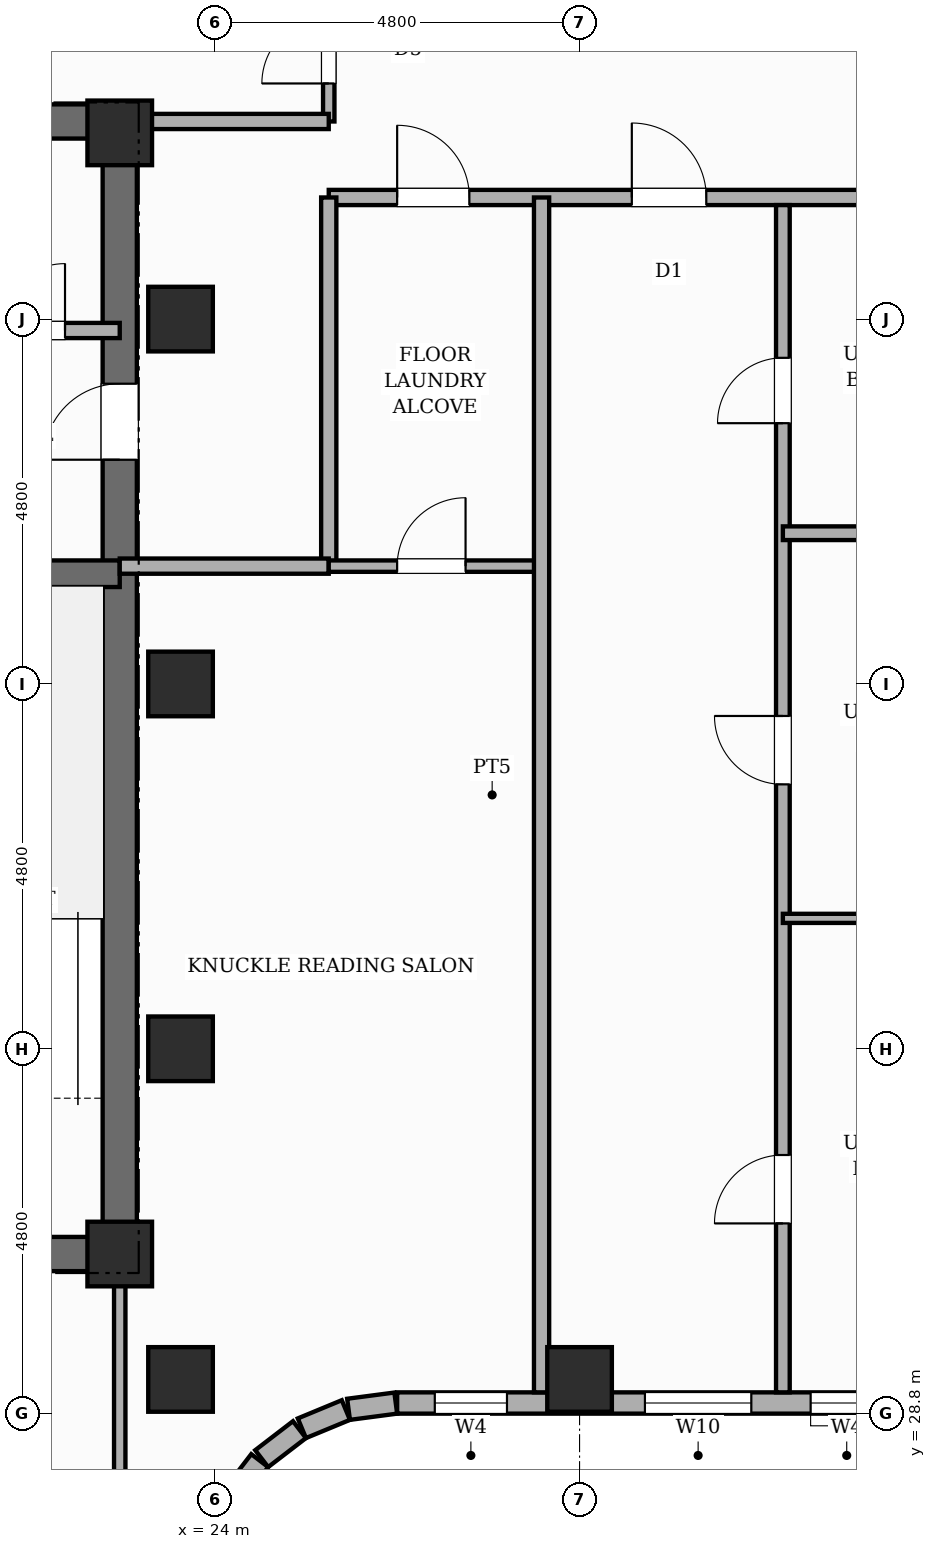
"""IFC4 building model, lengths in metres.
Left out: names, types, materials, properties, quantities, classifications, styles, units other than length and angle.
Written with IfcOpenShell. Run it as: python <this file> out.ifc"""

import sys

from ifc_helpers import new_model, si_unit, direction, frame, frame_2d, origin, origin_2d, place, context, subcontext, project, spatial, rectangle, extrude, element, fill, save


model = new_model("IFC4")
c1 = context("Model", 3, precision=1e-05, world=origin(), true_north=direction((0.0, 1.0)))
c2 = subcontext(c1, "Body", "Model", "MODEL_VIEW")
j1 = project(units=[si_unit("LENGTHUNIT", "METRE"), si_unit("PLANEANGLEUNIT", "RADIAN")], contexts=[c1])
p1 = place(None, origin())
s1 = spatial("IfcSite", under=j1, at=p1, CompositionType="ELEMENT")
p2 = place(p1, origin())
s2 = spatial("IfcBuilding", under=s1, at=p2, CompositionType="ELEMENT")
p3 = place(p2, frame((0.0, 0.0, 207.4)))
s3 = spatial("IfcBuildingStorey", under=s2, at=p3, CompositionType="ELEMENT", Elevation=207.4)
p4 = place(p3, frame((22.75, 30.675, 0.0), z_axis=(0.0, 0.0, 1.0), x_axis=(0.0, 1.0, 0.0)))
e1 = element("IfcWall", 1, at=p4, inside=s3, PredefinedType="SHEAR", context=c2, shape_type="SweptSolid", body=[
    extrude(rectangle(XDim=15.35, YDim=0.45, at=frame_2d((7.675, 0.0))), origin(), (0.0, 0.0, 1.0), 3.6),
])
p5 = place(p4, frame((10.675, 0.0, 0.0)))
e2 = element("IfcOpeningElement", 2, at=p5, cuts=e1, PredefinedType="OPENING", context=c2, shape_type="SweptSolid", body=[
    extrude(rectangle(XDim=1.0, YDim=2.15, at=frame_2d((0.5, 1.075))), frame((0.0, 0.235, 0.0), z_axis=(0.0, -1.0, 0.0), x_axis=(1.0, 0.0, 0.0)), (0.0, 0.0, 1.0), 0.47),
])
p6 = place(p3, frame((6.05, 45.8, 0.0), z_axis=(0.0, 0.0, 1.0), x_axis=(1.0, 0.0, 0.0)))
e3 = element("IfcWall", 3, at=p6, inside=s3, PredefinedType="SHEAR", context=c2, shape_type="SweptSolid", body=[
    extrude(rectangle(XDim=16.7, YDim=0.45, at=frame_2d((8.35, 0.0))), origin(), (0.0, 0.0, 1.0), 3.6),
])
p7 = place(p3, frame((18.84, 30.9, 0.0), z_axis=(0.0, 0.0, 1.0), x_axis=(1.0, 0.0, 0.0)))
e4 = element("IfcWall", 4, at=p7, inside=s3, PredefinedType="SHEAR", context=c2, shape_type="SweptSolid", body=[
    extrude(rectangle(XDim=3.91, YDim=0.45, at=frame_2d((1.955, 0.0))), origin(), (0.0, 0.0, 1.0), 3.6),
])
p8 = place(p3, frame((18.84, 39.85, 0.0), z_axis=(0.0, 0.0, 1.0), x_axis=(1.0, 0.0, 0.0)))
e5 = element("IfcWall", 5, at=p8, inside=s3, PredefinedType="SHEAR", context=c2, shape_type="SweptSolid", body=[
    extrude(rectangle(XDim=3.91, YDim=0.35, at=frame_2d((1.955, 0.0))), origin(), (0.0, 0.0, 1.0), 3.6),
])
for number, where, z_axis, x_axis in (
    (6, (22.75, 30.9, 0.0), (0.0, 0.0, 1.0), (1.0, 0.0, 0.0)),
    (7, (22.75, 45.65, 0.0), (0.0, 0.0, 1.0), (1.0, 0.0, 0.0)),
    (8, (23.55, 29.25, 0.0), (0.0, 0.0, 1.0), (1.0, 0.0, 0.0)),
    (9, (23.55, 33.6, 0.0), (0.0, 0.0, 1.0), (1.0, 0.0, 0.0)),
    (10, (23.55, 38.4, 0.0), (0.0, 0.0, 1.0), (1.0, 0.0, 0.0)),
    (11, (23.55, 43.2, 0.0), (0.0, 0.0, 1.0), (1.0, 0.0, 0.0)),
    (12, (28.8, 29.25, 0.0), (0.0, 0.0, 1.0), (1.0, 0.0, 0.0)),
):
    element("IfcColumn", number, at=place(p3, frame(where, z_axis=z_axis, x_axis=x_axis)), inside=s3, PredefinedType="COLUMN", context=c2, shape_type="SweptSolid", body=[
        extrude(rectangle(XDim=0.85, YDim=0.85, at=origin_2d()), origin(), (0.0, 0.0, 1.0), 3.6),
    ])
p9 = place(p3, frame((50.4, 28.94, 0.0), z_axis=(0.0, 0.0, 1.0), x_axis=(-1.0, 0.0, 0.0)))
e13 = element("IfcWall", 13, at=p9, inside=s3, PredefinedType="STANDARD", context=c2, shape_type="SweptSolid", body=[
    extrude(rectangle(XDim=24.0, YDim=0.28, at=frame_2d((12.0, 0.0))), origin(), (0.0, 0.0, 1.0), 2.66),
])
p10 = place(p9, frame((17.61, 0.0, 0.45)))
e14 = element("IfcOpeningElement", 14, at=p10, cuts=e13, PredefinedType="OPENING", context=c2, shape_type="SweptSolid", body=[
    extrude(rectangle(XDim=0.95, YDim=1.8, at=frame_2d((0.475, 0.9))), frame((0.0, 0.15, 0.0), z_axis=(0.0, -1.0, 0.0), x_axis=(1.0, 0.0, 0.0)), (0.0, 0.0, 1.0), 0.3),
])
p11 = place(p9, frame((9.438, 0.0, 0.65)))
e15 = element("IfcOpeningElement", 15, at=p11, cuts=e13, PredefinedType="OPENING", context=c2, shape_type="SweptSolid", body=[
    extrude(rectangle(XDim=1.4, YDim=1.1, at=frame_2d((0.7, 0.55))), frame((0.0, 0.15, 0.0), z_axis=(0.0, -1.0, 0.0), x_axis=(1.0, 0.0, 0.0)), (0.0, 0.0, 1.0), 0.3),
])
p12 = place(p9, frame((22.555, 0.0, 0.45)))
e16 = element("IfcOpeningElement", 16, at=p12, cuts=e13, PredefinedType="OPENING", context=c2, shape_type="SweptSolid", body=[
    extrude(rectangle(XDim=0.95, YDim=1.8, at=frame_2d((0.475, 0.9))), frame((0.0, 0.15, 0.0), z_axis=(0.0, -1.0, 0.0), x_axis=(1.0, 0.0, 0.0)), (0.0, 0.0, 1.0), 0.3),
])
p13 = place(p9, frame((4.1, 0.0, 0.65)))
e17 = element("IfcOpeningElement", 17, at=p13, cuts=e13, PredefinedType="OPENING", context=c2, shape_type="SweptSolid", body=[
    extrude(rectangle(XDim=1.4, YDim=1.1, at=frame_2d((0.7, 0.55))), frame((0.0, 0.15, 0.0), z_axis=(0.0, -1.0, 0.0), x_axis=(1.0, 0.0, 0.0)), (0.0, 0.0, 1.0), 0.3),
])
p14 = place(p9, frame((19.34, 0.0, 0.65)))
e18 = element("IfcOpeningElement", 18, at=p14, cuts=e13, PredefinedType="OPENING", context=c2, shape_type="SweptSolid", body=[
    extrude(rectangle(XDim=1.4, YDim=1.1, at=frame_2d((0.7, 0.55))), frame((0.0, 0.15, 0.0), z_axis=(0.0, -1.0, 0.0), x_axis=(1.0, 0.0, 0.0)), (0.0, 0.0, 1.0), 0.3),
])
p15 = place(p9, frame((13.76, 0.0, 0.65)))
e19 = element("IfcOpeningElement", 19, at=p15, cuts=e13, PredefinedType="OPENING", context=c2, shape_type="SweptSolid", body=[
    extrude(rectangle(XDim=1.4, YDim=1.1, at=frame_2d((0.7, 0.55))), frame((0.0, 0.15, 0.0), z_axis=(0.0, -1.0, 0.0), x_axis=(1.0, 0.0, 0.0)), (0.0, 0.0, 1.0), 0.3),
])
p16 = place(p9, frame((0.681, 0.0, 0.45)))
e20 = element("IfcOpeningElement", 20, at=p16, cuts=e13, PredefinedType="OPENING", context=c2, shape_type="SweptSolid", body=[
    extrude(rectangle(XDim=0.95, YDim=1.8, at=frame_2d((0.475, 0.9))), frame((0.0, 0.15, 0.0), z_axis=(0.0, -1.0, 0.0), x_axis=(1.0, 0.0, 0.0)), (0.0, 0.0, 1.0), 0.3),
])
p17 = place(p3, frame((26.382, 28.939, 0.0), z_axis=(0.0, 0.0, 1.0), x_axis=(-0.9914410257, -0.130555323746, 0.0)))
e21 = element("IfcWall", 21, at=p17, inside=s3, PredefinedType="STANDARD", context=c2, shape_type="SweptSolid", body=[
    extrude(rectangle(XDim=0.626, YDim=0.28, at=frame_2d((0.313, 0.0))), origin(), (0.0, 0.0, 1.0), 3.38),
])
p18 = place(p3, frame((25.725, 28.847, 0.0), z_axis=(0.0, 0.0, 1.0), x_axis=(-0.923974080304, -0.382455093999, 0.0)))
e22 = element("IfcWall", 22, at=p18, inside=s3, PredefinedType="STANDARD", context=c2, shape_type="SweptSolid", body=[
    extrude(rectangle(XDim=0.626, YDim=0.28, at=frame_2d((0.313, 0.0))), origin(), (0.0, 0.0, 1.0), 3.38),
])
for number, where, z_axis, x_axis in (
    (23, (25.115, 28.59, 0.0), (0.0, 0.0, 1.0), (-0.793, -0.609, 0.0)),
    (24, (24.592, 28.182, 0.0), (0.0, 0.0, 1.0), (-0.609, -0.793, 0.0)),
):
    element("IfcWall", number, at=place(p3, frame(where, z_axis=z_axis, x_axis=x_axis)), inside=s3, PredefinedType="STANDARD", context=c2, shape_type="SweptSolid", body=[
        extrude(rectangle(XDim=0.626, YDim=0.28, at=frame_2d((0.313, 0.0))), origin(), (0.0, 0.0, 1.0), 3.38),
    ])
p19 = place(p3, frame((20.5, 43.05, 0.0), z_axis=(0.0, 0.0, 1.0), x_axis=(1.0, 0.0, 0.0)))
e25 = element("IfcWall", 25, at=p19, inside=s3, PredefinedType="POLYGONAL", context=c2, shape_type="SweptSolid", body=[
    extrude(rectangle(XDim=2.25, YDim=0.2, at=frame_2d((1.125, 0.0))), origin(), (0.0, 0.0, 1.0), 2.66),
])
p20 = place(p19, frame((0.65, 0.0, 0.0)))
e26 = element("IfcOpeningElement", 26, at=p20, cuts=e25, PredefinedType="OPENING", context=c2, shape_type="SweptSolid", body=[
    extrude(rectangle(XDim=0.88, YDim=2.1, at=frame_2d((0.44, 1.05))), frame((0.0, 0.11, 0.0), z_axis=(0.0, -1.0, 0.0), x_axis=(1.0, 0.0, 0.0)), (0.0, 0.0, 1.0), 0.22),
])
p21 = place(p3, frame((22.75, 25.75, 0.0), z_axis=(0.0, 0.0, 1.0), x_axis=(0.0, 1.0, 0.0)))
e27 = element("IfcWall", 27, at=p21, inside=s3, PredefinedType="PARTITIONING", context=c2, shape_type="SweptSolid", body=[
    extrude(rectangle(XDim=5.15, YDim=0.15, at=frame_2d((2.575, 0.0))), origin(), (0.0, 0.0, 1.0), 3.38),
])
p22 = place(p3, frame((25.5, 45.8, 0.0), z_axis=(0.0, 0.0, 1.0), x_axis=(0.0, 1.0, 0.0)))
e28 = element("IfcWall", 28, at=p22, inside=s3, PredefinedType="PARTITIONING", context=c2, shape_type="SweptSolid", body=[
    extrude(rectangle(XDim=1.92, YDim=0.15, at=frame_2d((0.96, 0.0))), origin(), (0.0, 0.0, 1.0), 3.38),
])
p23 = place(p22, frame((0.5, 0.0, 0.0)))
e29 = element("IfcOpeningElement", 29, at=p23, cuts=e28, PredefinedType="OPENING", context=c2, shape_type="SweptSolid", body=[
    extrude(rectangle(XDim=0.88, YDim=2.1, at=frame_2d((0.44, 1.05))), frame((0.0, 0.085, 0.0), z_axis=(0.0, -1.0, 0.0), x_axis=(1.0, 0.0, 0.0)), (0.0, 0.0, 1.0), 0.17),
])
p24 = place(p3, frame((22.75, 45.8, 0.0), z_axis=(0.0, 0.0, 1.0), x_axis=(1.0, 0.0, 0.0)))
e30 = element("IfcWall", 30, at=p24, inside=s3, PredefinedType="PARTITIONING", context=c2, shape_type="SweptSolid", body=[
    extrude(rectangle(XDim=2.75, YDim=0.2, at=frame_2d((1.375, 0.0))), origin(), (0.0, 0.0, 1.0), 3.38),
])
p25 = place(p3, frame((25.5, 44.8, 0.0), z_axis=(0.0, 0.0, 1.0), x_axis=(1.0, 0.0, 0.0)))
e31 = element("IfcWall", 31, at=p25, inside=s3, PredefinedType="PARTITIONING", context=c2, shape_type="SweptSolid", body=[
    extrude(rectangle(XDim=16.28, YDim=0.2, at=frame_2d((8.14, 0.0))), origin(), (0.0, 0.0, 1.0), 3.38),
])
p26 = place(p25, frame((0.9, 0.0, 0.0)))
e32 = element("IfcOpeningElement", 32, at=p26, cuts=e31, PredefinedType="OPENING", context=c2, shape_type="SweptSolid", body=[
    extrude(rectangle(XDim=0.95, YDim=2.15, at=frame_2d((0.475, 1.075))), frame((0.0, 0.11, 0.0), z_axis=(0.0, -1.0, 0.0), x_axis=(1.0, 0.0, 0.0)), (0.0, 0.0, 1.0), 0.22),
])
p27 = place(p25, frame((3.988, 0.0, 0.0)))
e33 = element("IfcOpeningElement", 33, at=p27, cuts=e31, PredefinedType="OPENING", context=c2, shape_type="SweptSolid", body=[
    extrude(rectangle(XDim=0.98, YDim=2.18, at=frame_2d((0.49, 1.09))), frame((0.0, 0.11, 0.0), z_axis=(0.0, -1.0, 0.0), x_axis=(1.0, 0.0, 0.0)), (0.0, 0.0, 1.0), 0.22),
])
p28 = place(p25, frame((9.99, 0.0, 0.0)))
e34 = element("IfcOpeningElement", 34, at=p28, cuts=e31, PredefinedType="OPENING", context=c2, shape_type="SweptSolid", body=[
    extrude(rectangle(XDim=0.98, YDim=2.18, at=frame_2d((0.49, 1.09))), frame((0.0, 0.11, 0.0), z_axis=(0.0, -1.0, 0.0), x_axis=(1.0, 0.0, 0.0)), (0.0, 0.0, 1.0), 0.22),
])
p29 = place(p3, frame((25.5, 39.95, 0.0), z_axis=(0.0, 0.0, 1.0), x_axis=(0.0, 1.0, 0.0)))
e35 = element("IfcWall", 35, at=p29, inside=s3, PredefinedType="PARTITIONING", context=c2, shape_type="SweptSolid", body=[
    extrude(rectangle(XDim=4.85, YDim=0.2, at=frame_2d((2.425, 0.0))), origin(), (0.0, 0.0, 1.0), 3.38),
])
p30 = place(p3, frame((22.75, 39.95, 0.0), z_axis=(0.0, 0.0, 1.0), x_axis=(1.0, 0.0, 0.0)))
e36 = element("IfcWall", 36, at=p30, inside=s3, PredefinedType="PARTITIONING", context=c2, shape_type="SweptSolid", body=[
    extrude(rectangle(XDim=2.75, YDim=0.2, at=frame_2d((1.375, 0.0))), origin(), (0.0, 0.0, 1.0), 3.38),
])
p31 = place(p3, frame((25.5, 39.95, 0.0), z_axis=(0.0, 0.0, 1.0), x_axis=(1.0, 0.0, 0.0)))
e37 = element("IfcWall", 37, at=p31, inside=s3, PredefinedType="PARTITIONING", context=c2, shape_type="SweptSolid", body=[
    extrude(rectangle(XDim=2.8, YDim=0.15, at=frame_2d((1.4, 0.0))), origin(), (0.0, 0.0, 1.0), 3.38),
])
p32 = place(p31, frame((0.9, 0.0, 0.0)))
e38 = element("IfcOpeningElement", 38, at=p32, cuts=e37, PredefinedType="OPENING", context=c2, shape_type="SweptSolid", body=[
    extrude(rectangle(XDim=0.9, YDim=2.15, at=frame_2d((0.45, 1.075))), frame((0.0, 0.085, 0.0), z_axis=(0.0, -1.0, 0.0), x_axis=(1.0, 0.0, 0.0)), (0.0, 0.0, 1.0), 0.17),
])
p33 = place(p3, frame((28.3, 29.08, 0.0), z_axis=(0.0, 0.0, 1.0), x_axis=(0.0, 1.0, 0.0)))
e39 = element("IfcWall", 39, at=p33, inside=s3, PredefinedType="SOLIDWALL", context=c2, shape_type="SweptSolid", body=[
    extrude(rectangle(XDim=15.72, YDim=0.2, at=frame_2d((7.86, 0.0))), origin(), (0.0, 0.0, 1.0), 3.38),
])
p34 = place(p3, frame((31.475, 29.08, 0.0), z_axis=(0.0, 0.0, 1.0), x_axis=(0.0, 1.0, 0.0)))
e40 = element("IfcWall", 40, at=p34, inside=s3, PredefinedType="PLUMBINGWALL", context=c2, shape_type="SweptSolid", body=[
    extrude(rectangle(XDim=15.62, YDim=0.18, at=frame_2d((7.81, 0.0))), origin(), (0.0, 0.0, 1.0), 3.38),
])
p35 = place(p34, frame((2.223, 0.0, 0.0)))
e41 = element("IfcOpeningElement", 41, at=p35, cuts=e40, PredefinedType="OPENING", context=c2, shape_type="SweptSolid", body=[
    extrude(rectangle(XDim=0.9, YDim=2.15, at=frame_2d((0.45, 1.075))), frame((0.0, 0.1, 0.0), z_axis=(0.0, -1.0, 0.0), x_axis=(1.0, 0.0, 0.0)), (0.0, 0.0, 1.0), 0.2),
])
p36 = place(p34, frame((7.999, 0.0, 0.0)))
e42 = element("IfcOpeningElement", 42, at=p36, cuts=e40, PredefinedType="OPENING", context=c2, shape_type="SweptSolid", body=[
    extrude(rectangle(XDim=0.9, YDim=2.15, at=frame_2d((0.45, 1.075))), frame((0.0, 0.1, 0.0), z_axis=(0.0, -1.0, 0.0), x_axis=(1.0, 0.0, 0.0)), (0.0, 0.0, 1.0), 0.2),
])
p37 = place(p34, frame((12.75, 0.0, 0.0)))
e43 = element("IfcOpeningElement", 43, at=p37, cuts=e40, PredefinedType="OPENING", context=c2, shape_type="SweptSolid", body=[
    extrude(rectangle(XDim=0.86, YDim=2.1, at=frame_2d((0.43, 1.05))), frame((0.0, 0.1, 0.0), z_axis=(0.0, -1.0, 0.0), x_axis=(1.0, 0.0, 0.0)), (0.0, 0.0, 1.0), 0.2),
])
p38 = place(p3, frame((31.475, 35.316, 0.0), z_axis=(0.0, 0.0, 1.0), x_axis=(1.0, 0.0, 0.0)))
e44 = element("IfcWall", 44, at=p38, inside=s3, PredefinedType="PARTITIONING", context=c2, shape_type="SweptSolid", body=[
    extrude(rectangle(XDim=3.325, YDim=0.12, at=frame_2d((1.663, 0.0))), origin(), (0.0, 0.0, 1.0), 3.38),
])
p39 = place(p3, frame((31.475, 40.383, 0.0), z_axis=(0.0, 0.0, 1.0), x_axis=(1.0, 0.0, 0.0)))
e45 = element("IfcWall", 45, at=p39, inside=s3, PredefinedType="PLUMBINGWALL", context=c2, shape_type="SweptSolid", body=[
    extrude(rectangle(XDim=3.325, YDim=0.18, at=frame_2d((1.663, 0.0))), origin(), (0.0, 0.0, 1.0), 3.38),
])
p40 = place(p10, origin())
e46 = element("IfcWindow", 46, at=p40, inside=s3, PartitioningType="SINGLE_PANEL", PredefinedType="WINDOW", context=c2, shape_type="SweptSolid", body=[
    extrude(rectangle(XDim=0.95, YDim=1.8, at=frame_2d((0.475, 0.9))), frame((0.0, 0.03, 0.0), z_axis=(0.0, -1.0, 0.0), x_axis=(1.0, 0.0, 0.0)), (0.0, 0.0, 1.0), 0.06),
])
fill(e14, e46)
p41 = place(p12, origin())
e47 = element("IfcWindow", 47, at=p41, inside=s3, PartitioningType="SINGLE_PANEL", PredefinedType="WINDOW", context=c2, shape_type="SweptSolid", body=[
    extrude(rectangle(XDim=0.95, YDim=1.8, at=frame_2d((0.475, 0.9))), frame((0.0, 0.03, 0.0), z_axis=(0.0, -1.0, 0.0), x_axis=(1.0, 0.0, 0.0)), (0.0, 0.0, 1.0), 0.06),
])
fill(e16, e47)
p42 = place(p14, origin())
e48 = element("IfcWindow", 48, at=p42, inside=s3, PartitioningType="SINGLE_PANEL", PredefinedType="WINDOW", context=c2, shape_type="SweptSolid", body=[
    extrude(rectangle(XDim=1.4, YDim=1.1, at=frame_2d((0.7, 0.55))), frame((0.0, 0.03, 0.0), z_axis=(0.0, -1.0, 0.0), x_axis=(1.0, 0.0, 0.0)), (0.0, 0.0, 1.0), 0.06),
])
fill(e18, e48)
p43 = place(p5, origin())
e49 = element("IfcDoor", 49, at=p43, inside=s3, OperationType="SINGLE_SWING_LEFT", PredefinedType="DOOR", context=c2, shape_type="SweptSolid", body=[
    extrude(rectangle(XDim=1.0, YDim=2.15, at=frame_2d((0.5, 1.075))), frame((0.0, 0.025, 0.0), z_axis=(0.0, -1.0, 0.0), x_axis=(1.0, 0.0, 0.0)), (0.0, 0.0, 1.0), 0.05),
])
fill(e2, e49)
p44 = place(p20, origin())
e50 = element("IfcDoor", 50, at=p44, inside=s3, OperationType="SINGLE_SWING_RIGHT", PredefinedType="DOOR", context=c2, shape_type="SweptSolid", body=[
    extrude(rectangle(XDim=0.88, YDim=2.1, at=frame_2d((0.44, 1.05))), frame((0.0, 0.025, 0.0), z_axis=(0.0, -1.0, 0.0), x_axis=(1.0, 0.0, 0.0)), (0.0, 0.0, 1.0), 0.05),
])
fill(e26, e50)
p45 = place(p23, origin())
e51 = element("IfcDoor", 51, at=p45, inside=s3, OperationType="SINGLE_SWING_LEFT", PredefinedType="DOOR", context=c2, shape_type="SweptSolid", body=[
    extrude(rectangle(XDim=0.88, YDim=2.1, at=frame_2d((0.44, 1.05))), frame((0.0, 0.025, 0.0), z_axis=(0.0, -1.0, 0.0), x_axis=(1.0, 0.0, 0.0)), (0.0, 0.0, 1.0), 0.05),
])
fill(e29, e51)
p46 = place(p26, origin())
e52 = element("IfcDoor", 52, at=p46, inside=s3, OperationType="SINGLE_SWING_LEFT", PredefinedType="DOOR", context=c2, shape_type="SweptSolid", body=[
    extrude(rectangle(XDim=0.95, YDim=2.15, at=frame_2d((0.475, 1.075))), frame((0.0, 0.025, 0.0), z_axis=(0.0, -1.0, 0.0), x_axis=(1.0, 0.0, 0.0)), (0.0, 0.0, 1.0), 0.05),
])
fill(e32, e52)
p47 = place(p32, origin())
e53 = element("IfcDoor", 53, at=p47, inside=s3, OperationType="SINGLE_SWING_RIGHT", PredefinedType="DOOR", context=c2, shape_type="SweptSolid", body=[
    extrude(rectangle(XDim=0.9, YDim=2.15, at=frame_2d((0.45, 1.075))), frame((0.0, 0.025, 0.0), z_axis=(0.0, -1.0, 0.0), x_axis=(1.0, 0.0, 0.0)), (0.0, 0.0, 1.0), 0.05),
])
fill(e38, e53)
p48 = place(p27, origin())
e54 = element("IfcDoor", 54, at=p48, inside=s3, OperationType="SINGLE_SWING_LEFT", PredefinedType="DOOR", context=c2, shape_type="SweptSolid", body=[
    extrude(rectangle(XDim=0.98, YDim=2.18, at=frame_2d((0.49, 1.09))), frame((0.0, 0.025, 0.0), z_axis=(0.0, -1.0, 0.0), x_axis=(1.0, 0.0, 0.0)), (0.0, 0.0, 1.0), 0.05),
])
fill(e33, e54)
p49 = place(p35, origin())
e55 = element("IfcDoor", 55, at=p49, inside=s3, OperationType="SINGLE_SWING_LEFT", PredefinedType="DOOR", context=c2, shape_type="SweptSolid", body=[
    extrude(rectangle(XDim=0.9, YDim=2.15, at=frame_2d((0.45, 1.075))), frame((0.0, 0.025, 0.0), z_axis=(0.0, -1.0, 0.0), x_axis=(1.0, 0.0, 0.0)), (0.0, 0.0, 1.0), 0.05),
])
fill(e41, e55)
p50 = place(p36, origin())
e56 = element("IfcDoor", 56, at=p50, inside=s3, OperationType="SINGLE_SWING_RIGHT", PredefinedType="DOOR", context=c2, shape_type="SweptSolid", body=[
    extrude(rectangle(XDim=0.9, YDim=2.15, at=frame_2d((0.45, 1.075))), frame((0.0, 0.025, 0.0), z_axis=(0.0, -1.0, 0.0), x_axis=(1.0, 0.0, 0.0)), (0.0, 0.0, 1.0), 0.05),
])
fill(e42, e56)
p51 = place(p37, origin())
e57 = element("IfcDoor", 57, at=p51, inside=s3, OperationType="SINGLE_SWING_LEFT", PredefinedType="DOOR", context=c2, shape_type="SweptSolid", body=[
    extrude(rectangle(XDim=0.86, YDim=2.1, at=frame_2d((0.43, 1.05))), frame((0.0, 0.025, 0.0), z_axis=(0.0, -1.0, 0.0), x_axis=(1.0, 0.0, 0.0)), (0.0, 0.0, 1.0), 0.05),
])
fill(e43, e57)
save(model, sys.argv[1])
